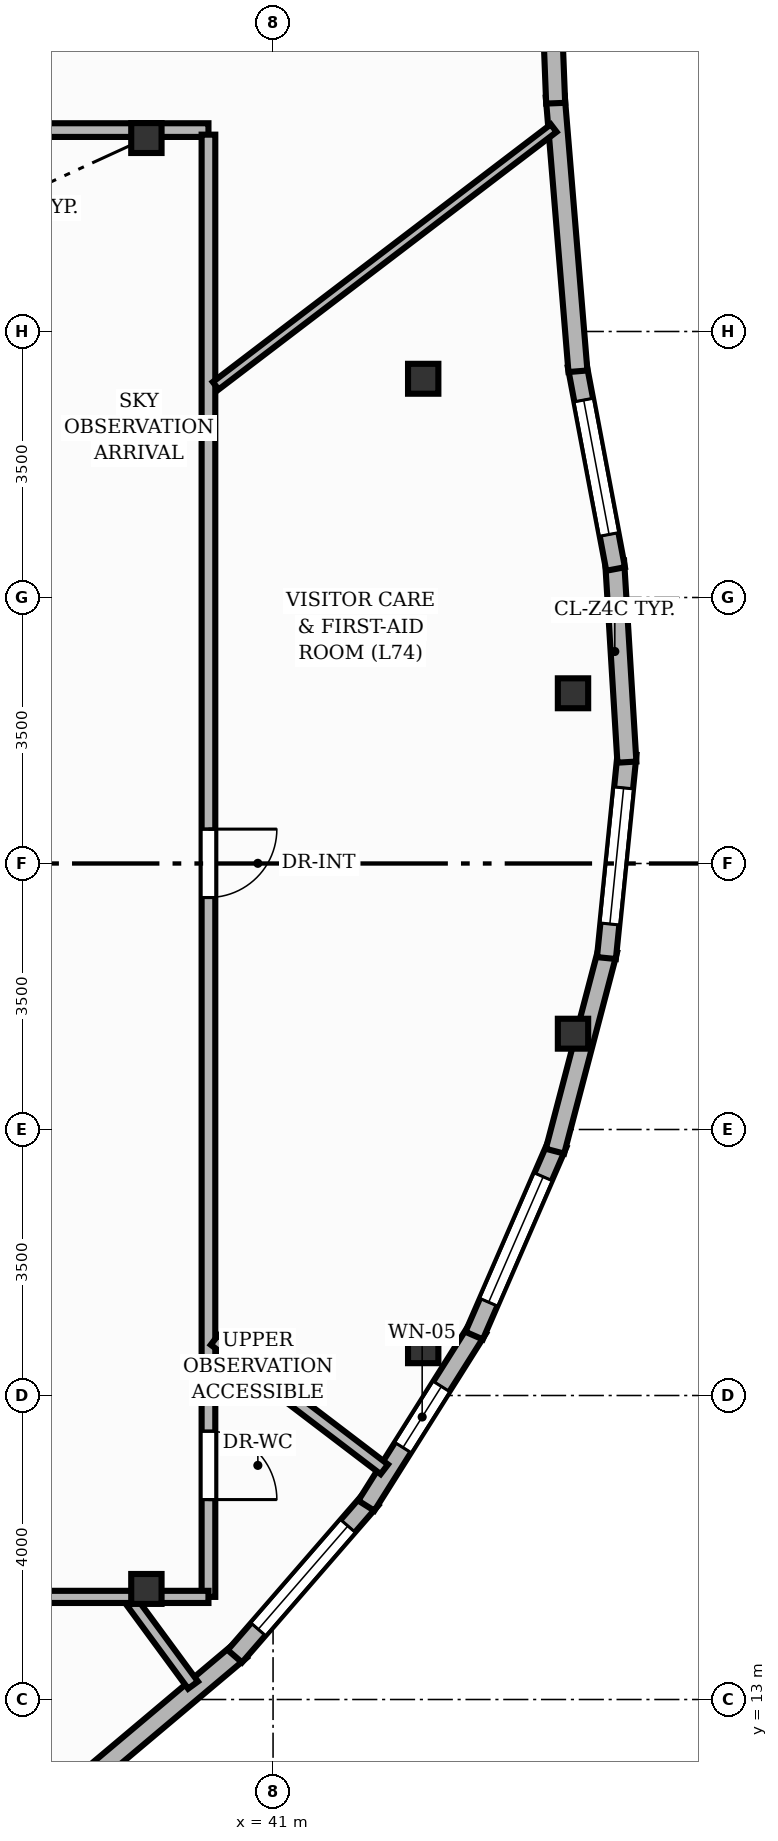
"""IFC4 building model, lengths in metres.
Left out: names, types, materials, properties, quantities, classifications, styles, units other than length and angle.
Written with IfcOpenShell. Run it as: python <this file> out.ifc"""

import sys

from ifc_helpers import new_model, si_unit, direction, frame, frame_2d, origin, origin_2d, place, context, subcontext, project, spatial, rectangle, i_section, extrude, element, fill, save


model = new_model("IFC4")
c1 = context("Model", 3, precision=1e-05, world=origin(), true_north=direction((0.0, 1.0)))
c2 = subcontext(c1, "Body", "Model", "MODEL_VIEW")
j1 = project(units=[si_unit("LENGTHUNIT", "METRE"), si_unit("PLANEANGLEUNIT", "RADIAN")], contexts=[c1])
p1 = place(None, origin())
s1 = spatial("IfcSite", under=j1, at=p1, CompositionType="ELEMENT")
p2 = place(p1, origin())
s2 = spatial("IfcBuilding", under=s1, at=p2, CompositionType="ELEMENT")
p3 = place(p2, frame((0.0, 0.0, 246.88)))
s3 = spatial("IfcBuildingStorey", under=s2, at=p3, CompositionType="ELEMENT", Elevation=246.88)
for number, where, z_axis, x_axis in (
    (1, (44.946, 26.24, 0.0), (0.0, 0.0, 1.0), (1.0, 0.0, 0.0)),
    (2, (42.975, 30.378, 0.0), (0.0, 0.0, 1.0), (1.0, 0.0, 0.0)),
    (3, (39.333, 33.545, 0.0), (0.0, 0.0, 1.0), (1.0, 0.0, 0.0)),
    (4, (39.333, 14.455, 0.0), (0.0, 0.0, 1.0), (1.0, 0.0, 0.0)),
    (5, (42.975, 17.622, 0.0), (0.0, 0.0, 1.0), (1.0, 0.0, 0.0)),
    (6, (44.946, 21.76, 0.0), (0.0, 0.0, 1.0), (1.0, 0.0, 0.0)),
):
    element("IfcColumn", number, at=place(p3, frame(where, z_axis=z_axis, x_axis=x_axis)), inside=s3, PredefinedType="COLUMN", context=c2, shape_type="SweptSolid", body=[
        extrude(i_section(OverallWidth=0.399, OverallDepth=0.394, WebThickness=0.023, FlangeThickness=0.037, at=origin_2d()), origin(), (0.0, 0.0, 1.0), 4.16),
    ])
p4 = place(p3, frame((40.575, 13.646, 0.0), z_axis=(0.0, 0.0, 1.0), x_axis=(-0.765011949935, -0.644016084005, 0.0)))
e7 = element("IfcWall", 7, at=p4, inside=s3, PredefinedType="SOLIDWALL", context=c2, shape_type="SweptSolid", body=[
    extrude(rectangle(XDim=2.702, YDim=0.25, at=frame_2d((1.351, 0.0))), origin(), (0.0, 0.0, 1.0), 3.84),
])
p5 = place(p3, frame((42.292, 15.637, 0.0), z_axis=(0.0, 0.0, 1.0), x_axis=(-0.655463265554, -0.755227056924, 0.0)))
e8 = element("IfcWall", 8, at=p5, inside=s3, PredefinedType="SOLIDWALL", context=c2, shape_type="SweptSolid", body=[
    extrude(rectangle(XDim=2.738, YDim=0.25, at=frame_2d((1.369, 0.0))), origin(), (0.0, 0.0, 1.0), 3.84),
])
p6 = place(p5, frame((0.469, 0.0, 0.85)))
e9 = element("IfcOpeningElement", 9, at=p6, cuts=e8, PredefinedType="OPENING", context=c2, shape_type="SweptSolid", body=[
    extrude(rectangle(XDim=1.8, YDim=2.0, at=frame_2d((0.9, 1.0))), frame((0.0, 0.135, 0.0), z_axis=(0.0, -1.0, 0.0), x_axis=(1.0, 0.0, 0.0)), (0.0, 0.0, 1.0), 0.27),
])
p7 = place(p3, frame((43.697, 17.884, 0.0), z_axis=(0.0, 0.0, 1.0), x_axis=(-0.532693532032, -0.846308218636, 0.0)))
e10 = element("IfcWall", 10, at=p7, inside=s3, PredefinedType="SOLIDWALL", context=c2, shape_type="SweptSolid", body=[
    extrude(rectangle(XDim=2.758, YDim=0.25, at=frame_2d((1.379, 0.0))), origin(), (0.0, 0.0, 1.0), 3.84),
])
p8 = place(p7, frame((0.904, 0.0, 0.85)))
e11 = element("IfcOpeningElement", 11, at=p8, cuts=e10, PredefinedType="OPENING", context=c2, shape_type="SweptSolid", body=[
    extrude(rectangle(XDim=0.95, YDim=1.45, at=frame_2d((0.475, 0.725))), frame((0.0, 0.135, 0.0), z_axis=(0.0, -1.0, 0.0), x_axis=(1.0, 0.0, 0.0)), (0.0, 0.0, 1.0), 0.27),
])
p9 = place(p3, frame((44.745, 20.317, 0.0), z_axis=(0.0, 0.0, 1.0), x_axis=(-0.398625762511, -0.917113679683, 0.0)))
e12 = element("IfcWall", 12, at=p9, inside=s3, PredefinedType="SOLIDWALL", context=c2, shape_type="SweptSolid", body=[
    extrude(rectangle(XDim=2.758, YDim=0.25, at=frame_2d((1.379, 0.0))), origin(), (0.0, 0.0, 1.0), 3.84),
])
p10 = place(p9, frame((0.479, 0.0, 0.85)))
e13 = element("IfcOpeningElement", 13, at=p10, cuts=e12, PredefinedType="OPENING", context=c2, shape_type="SweptSolid", body=[
    extrude(rectangle(XDim=1.8, YDim=2.0, at=frame_2d((0.9, 1.0))), frame((0.0, 0.135, 0.0), z_axis=(0.0, -1.0, 0.0), x_axis=(1.0, 0.0, 0.0)), (0.0, 0.0, 1.0), 0.27),
])
p11 = place(p3, frame((45.406, 22.863, 0.0), z_axis=(0.0, 0.0, 1.0), x_axis=(-0.254159789005, -0.967162241639, 0.0)))
e14 = element("IfcWall", 14, at=p11, inside=s3, PredefinedType="SOLIDWALL", context=c2, shape_type="SweptSolid", body=[
    extrude(rectangle(XDim=2.739, YDim=0.25, at=frame_2d((1.369, 0.0))), origin(), (0.0, 0.0, 1.0), 2.907),
])
p12 = place(p3, frame((45.658, 25.444, 0.0), z_axis=(0.0, 0.0, 1.0), x_axis=(-0.100577316095, -0.994929245468, 0.0)))
e15 = element("IfcWall", 15, at=p12, inside=s3, PredefinedType="SOLIDWALL", context=c2, shape_type="SweptSolid", body=[
    extrude(rectangle(XDim=2.702, YDim=0.25, at=frame_2d((1.351, 0.0))), origin(), (0.0, 0.0, 1.0), 3.84),
])
p13 = place(p12, frame((0.451, 0.0, 0.85)))
e16 = element("IfcOpeningElement", 16, at=p13, cuts=e15, PredefinedType="OPENING", context=c2, shape_type="SweptSolid", body=[
    extrude(rectangle(XDim=1.8, YDim=2.0, at=frame_2d((0.9, 1.0))), frame((0.0, 0.135, 0.0), z_axis=(0.0, -1.0, 0.0), x_axis=(1.0, 0.0, 0.0)), (0.0, 0.0, 1.0), 0.27),
])
p14 = place(p3, frame((45.494, 27.98, 0.0), z_axis=(0.0, 0.0, 1.0), x_axis=(0.060967752852, -0.998139736266, 0.0)))
e17 = element("IfcWall", 17, at=p14, inside=s3, PredefinedType="SOLIDWALL", context=c2, shape_type="SweptSolid", body=[
    extrude(rectangle(XDim=2.651, YDim=0.25, at=frame_2d((1.325, 0.0))), origin(), (0.0, 0.0, 1.0), 3.84),
])
p15 = place(p3, frame((45.001, 30.553, 0.0), z_axis=(0.0, 0.0, 1.0), x_axis=(0.185629842264, -0.982619744184, 0.0)))
e18 = element("IfcWall", 18, at=p15, inside=s3, PredefinedType="SOLIDWALL", context=c2, shape_type="SweptSolid", body=[
    extrude(rectangle(XDim=2.725, YDim=0.25, at=frame_2d((1.363, 0.0))), origin(), (0.0, 0.0, 1.0), 3.84),
])
p16 = place(p15, frame((0.463, 0.0, 0.85)))
e19 = element("IfcOpeningElement", 19, at=p16, cuts=e18, PredefinedType="OPENING", context=c2, shape_type="SweptSolid", body=[
    extrude(rectangle(XDim=1.8, YDim=2.0, at=frame_2d((0.9, 1.0))), frame((0.0, 0.135, 0.0), z_axis=(0.0, -1.0, 0.0), x_axis=(1.0, 0.0, 0.0)), (0.0, 0.0, 1.0), 0.27),
])
p17 = place(p3, frame((44.713, 34.088, 0.0), z_axis=(0.0, 0.0, 1.0), x_axis=(0.082331752524, -0.996604978177, 0.0)))
e20 = element("IfcWall", 20, at=p17, inside=s3, PredefinedType="SOLIDWALL", context=c2, shape_type="SweptSolid", body=[
    extrude(rectangle(XDim=3.624, YDim=0.25, at=frame_2d((1.812, 0.0))), origin(), (0.0, 0.0, 1.0), 3.84),
])
p18 = place(p3, frame((44.551, 38.29, 0.0), z_axis=(0.0, 0.0, 1.0), x_axis=(0.038990550377, -0.999239579371, 0.0)))
e21 = element("IfcWall", 21, at=p18, inside=s3, PredefinedType="SOLIDWALL", context=c2, shape_type="SweptSolid", body=[
    extrude(rectangle(XDim=4.289, YDim=0.25, at=frame_2d((2.145, 0.0))), origin(), (0.0, 0.0, 1.0), 3.84),
])
p19 = place(p18, frame((1.245, 0.0, 0.85)))
e22 = element("IfcOpeningElement", 22, at=p19, cuts=e21, PredefinedType="OPENING", context=c2, shape_type="SweptSolid", body=[
    extrude(rectangle(XDim=1.8, YDim=2.0, at=frame_2d((0.9, 1.0))), frame((0.0, 0.135, 0.0), z_axis=(0.0, -1.0, 0.0), x_axis=(1.0, 0.0, 0.0)), (0.0, 0.0, 1.0), 0.27),
])
p20 = place(p3, frame((23.85, 33.65, 0.0), z_axis=(0.0, 0.0, 1.0), x_axis=(1.0, 0.0, 0.0)))
e23 = element("IfcWall", 23, at=p20, inside=s3, PredefinedType="PARTITIONING", context=c2, shape_type="SweptSolid", body=[
    extrude(rectangle(XDim=16.3, YDim=0.18, at=frame_2d((8.15, 0.0))), origin(), (0.0, 0.0, 1.0), 2.9),
])
p21 = place(p20, frame((12.16, 0.0, 0.0)))
e24 = element("IfcOpeningElement", 24, at=p21, cuts=e23, PredefinedType="OPENING", context=c2, shape_type="SweptSolid", body=[
    extrude(rectangle(XDim=0.9, YDim=2.1, at=frame_2d((0.45, 1.05))), frame((0.0, 0.1, 0.0), z_axis=(0.0, -1.0, 0.0), x_axis=(1.0, 0.0, 0.0)), (0.0, 0.0, 1.0), 0.2),
])
p22 = place(p20, frame((4.03, 0.0, 0.0)))
e25 = element("IfcOpeningElement", 25, at=p22, cuts=e23, PredefinedType="OPENING", context=c2, shape_type="SweptSolid", body=[
    extrude(rectangle(XDim=0.9, YDim=2.1, at=frame_2d((0.45, 1.05))), frame((0.0, 0.1, 0.0), z_axis=(0.0, -1.0, 0.0), x_axis=(1.0, 0.0, 0.0)), (0.0, 0.0, 1.0), 0.2),
])
p23 = place(p3, frame((40.15, 33.59, 0.0), z_axis=(0.0, 0.0, 1.0), x_axis=(0.0, -1.0, 0.0)))
e26 = element("IfcWall", 26, at=p23, inside=s3, PredefinedType="PARTITIONING", context=c2, shape_type="SweptSolid", body=[
    extrude(rectangle(XDim=19.24, YDim=0.18, at=frame_2d((9.62, 0.0))), origin(), (0.0, 0.0, 1.0), 3.835),
])
p24 = place(p23, frame((9.138, 0.0, 0.0)))
e27 = element("IfcOpeningElement", 27, at=p24, cuts=e26, PredefinedType="OPENING", context=c2, shape_type="SweptSolid", body=[
    extrude(rectangle(XDim=0.9, YDim=2.1, at=frame_2d((0.45, 1.05))), frame((0.0, 0.1, 0.0), z_axis=(0.0, -1.0, 0.0), x_axis=(1.0, 0.0, 0.0)), (0.0, 0.0, 1.0), 0.2),
])
p25 = place(p23, frame((17.059, 0.0, 0.0)))
e28 = element("IfcOpeningElement", 28, at=p25, cuts=e26, PredefinedType="OPENING", context=c2, shape_type="SweptSolid", body=[
    extrude(rectangle(XDim=0.9, YDim=2.1, at=frame_2d((0.45, 1.05))), frame((0.0, 0.1, 0.0), z_axis=(0.0, -1.0, 0.0), x_axis=(1.0, 0.0, 0.0)), (0.0, 0.0, 1.0), 0.2),
])
p26 = place(p3, frame((40.15, 14.35, 0.0), z_axis=(0.0, 0.0, 1.0), x_axis=(-1.0, 0.0, 0.0)))
e29 = element("IfcWall", 29, at=p26, inside=s3, PredefinedType="PLUMBINGWALL", context=c2, shape_type="SweptSolid", body=[
    extrude(rectangle(XDim=16.3, YDim=0.16, at=frame_2d((8.15, 0.0))), origin(), (0.0, 0.0, 1.0), 2.9),
])
p27 = place(p26, frame((8.216, 0.0, 0.0)))
e30 = element("IfcOpeningElement", 30, at=p27, cuts=e29, PredefinedType="OPENING", context=c2, shape_type="SweptSolid", body=[
    extrude(rectangle(XDim=0.9, YDim=2.1, at=frame_2d((0.45, 1.05))), frame((0.0, 0.09, 0.0), z_axis=(0.0, -1.0, 0.0), x_axis=(1.0, 0.0, 0.0)), (0.0, 0.0, 1.0), 0.18),
])
p28 = place(p3, frame((44.692, 33.676, 0.0), z_axis=(0.0, 0.0, 1.0), x_axis=(-0.795254273131, -0.606276043619, 0.0)))
e31 = element("IfcWall", 31, at=p28, inside=s3, PredefinedType="PARTITIONING", context=c2, shape_type="SweptSolid", body=[
    extrude(rectangle(XDim=5.591, YDim=0.125, at=frame_2d((2.796, 0.0))), origin(), (0.0, 0.0, 1.0), 3.835),
])
p29 = place(p3, frame((39.153, 14.269, 0.0), z_axis=(0.0, 0.0, 1.0), x_axis=(0.592279184354, -0.805732814139, 0.0)))
e32 = element("IfcWall", 32, at=p29, inside=s3, PredefinedType="PLUMBINGWALL", context=c2, shape_type="SweptSolid", body=[
    extrude(rectangle(XDim=1.341, YDim=0.16, at=frame_2d((0.67, 0.0))), origin(), (0.0, 0.0, 1.0), 2.9),
])
p30 = place(p3, frame((42.464, 16.029, 0.0), z_axis=(0.0, 0.0, 1.0), x_axis=(-0.7954816045, 0.605977736309, 0.0)))
e33 = element("IfcWall", 33, at=p30, inside=s3, PredefinedType="PLUMBINGWALL", context=c2, shape_type="SweptSolid", body=[
    extrude(rectangle(XDim=2.809, YDim=0.16, at=frame_2d((1.404, 0.0))), origin(), (0.0, 0.0, 1.0), 3.835),
])
p31 = place(p6, origin())
e34 = element("IfcWindow", 34, at=p31, inside=s3, PartitioningType="SINGLE_PANEL", PredefinedType="WINDOW", context=c2, shape_type="SweptSolid", body=[
    extrude(rectangle(XDim=1.8, YDim=2.0, at=frame_2d((0.9, 1.0))), frame((0.0, 0.03, 0.0), z_axis=(0.0, -1.0, 0.0), x_axis=(1.0, 0.0, 0.0)), (0.0, 0.0, 1.0), 0.06),
])
fill(e9, e34)
p32 = place(p8, origin())
e35 = element("IfcWindow", 35, at=p32, inside=s3, PartitioningType="SINGLE_PANEL", PredefinedType="WINDOW", context=c2, shape_type="SweptSolid", body=[
    extrude(rectangle(XDim=0.95, YDim=1.45, at=frame_2d((0.475, 0.725))), frame((0.0, 0.03, 0.0), z_axis=(0.0, -1.0, 0.0), x_axis=(1.0, 0.0, 0.0)), (0.0, 0.0, 1.0), 0.06),
])
fill(e11, e35)
p33 = place(p10, origin())
e36 = element("IfcWindow", 36, at=p33, inside=s3, PartitioningType="SINGLE_PANEL", PredefinedType="WINDOW", context=c2, shape_type="SweptSolid", body=[
    extrude(rectangle(XDim=1.8, YDim=2.0, at=frame_2d((0.9, 1.0))), frame((0.0, 0.03, 0.0), z_axis=(0.0, -1.0, 0.0), x_axis=(1.0, 0.0, 0.0)), (0.0, 0.0, 1.0), 0.06),
])
fill(e13, e36)
p34 = place(p13, origin())
e37 = element("IfcWindow", 37, at=p34, inside=s3, PartitioningType="SINGLE_PANEL", PredefinedType="WINDOW", context=c2, shape_type="SweptSolid", body=[
    extrude(rectangle(XDim=1.8, YDim=2.0, at=frame_2d((0.9, 1.0))), frame((0.0, 0.03, 0.0), z_axis=(0.0, -1.0, 0.0), x_axis=(1.0, 0.0, 0.0)), (0.0, 0.0, 1.0), 0.06),
])
fill(e16, e37)
p35 = place(p16, origin())
e38 = element("IfcWindow", 38, at=p35, inside=s3, PartitioningType="SINGLE_PANEL", PredefinedType="WINDOW", context=c2, shape_type="SweptSolid", body=[
    extrude(rectangle(XDim=1.8, YDim=2.0, at=frame_2d((0.9, 1.0))), frame((0.0, 0.03, 0.0), z_axis=(0.0, -1.0, 0.0), x_axis=(1.0, 0.0, 0.0)), (0.0, 0.0, 1.0), 0.06),
])
fill(e19, e38)
p36 = place(p24, origin())
e39 = element("IfcDoor", 39, at=p36, inside=s3, OperationType="SINGLE_SWING_LEFT", PredefinedType="DOOR", context=c2, shape_type="SweptSolid", body=[
    extrude(rectangle(XDim=0.9, YDim=2.1, at=frame_2d((0.45, 1.05))), frame((0.0, 0.025, 0.0), z_axis=(0.0, -1.0, 0.0), x_axis=(1.0, 0.0, 0.0)), (0.0, 0.0, 1.0), 0.05),
])
fill(e27, e39)
p37 = place(p25, origin())
e40 = element("IfcDoor", 40, at=p37, inside=s3, OperationType="SINGLE_SWING_RIGHT", PredefinedType="DOOR", context=c2, shape_type="SweptSolid", body=[
    extrude(rectangle(XDim=0.9, YDim=2.1, at=frame_2d((0.45, 1.05))), frame((0.0, 0.025, 0.0), z_axis=(0.0, -1.0, 0.0), x_axis=(1.0, 0.0, 0.0)), (0.0, 0.0, 1.0), 0.05),
])
fill(e28, e40)
save(model, sys.argv[1])
